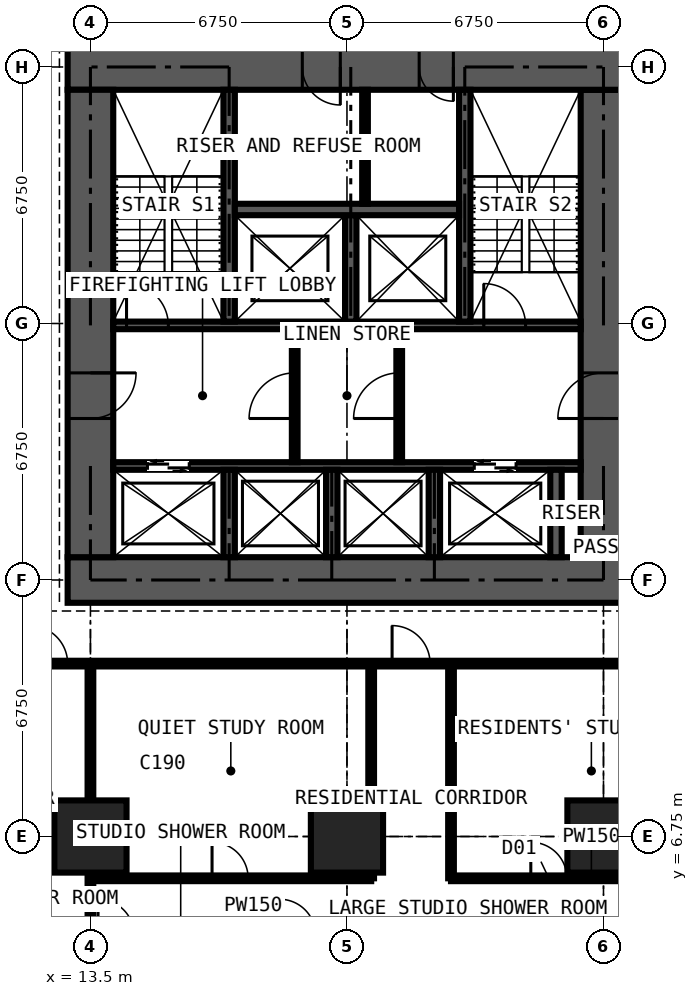
"""IFC4 building model, lengths in metres.
Left out: names, types, materials, properties, quantities, classifications, styles, units other than length and angle.
Written with IfcOpenShell. Run it as: python <this file> out.ifc"""

import sys

from ifc_helpers import new_model, si_unit, direction, frame, frame_2d, origin, origin_2d, place, context, subcontext, project, spatial, rectangle, extrude, element, fill, save


model = new_model("IFC4")
c1 = context("Model", 3, precision=1e-05, world=origin(), true_north=direction((0.0, 1.0)))
c2 = subcontext(c1, "Body", "Model", "MODEL_VIEW")
j1 = project(units=[si_unit("LENGTHUNIT", "METRE"), si_unit("PLANEANGLEUNIT", "RADIAN")], contexts=[c1])
p1 = place(None, origin())
s1 = spatial("IfcSite", under=j1, at=p1, CompositionType="ELEMENT")
p2 = place(p1, origin())
s2 = spatial("IfcBuilding", under=s1, at=p2, CompositionType="ELEMENT")
p3 = place(p2, frame((0.0, 0.0, 28.8)))
s3 = spatial("IfcBuildingStorey", under=s2, at=p3, CompositionType="ELEMENT", Elevation=28.8)
for number, where, z_axis, x_axis in (
    (1, (13.5, 6.75, 0.0), (0.0, 0.0, 1.0), (1.0, 0.0, 0.0)),
    (2, (20.25, 6.75, 0.0), (0.0, 0.0, 1.0), (1.0, 0.0, 0.0)),
    (3, (27.0, 6.75, 0.0), (0.0, 0.0, 1.0), (1.0, 0.0, 0.0)),
):
    element("IfcColumn", number, at=place(p3, frame(where, z_axis=z_axis, x_axis=x_axis)), inside=s3, PredefinedType="COLUMN", context=c2, shape_type="SweptSolid", body=[
        extrude(rectangle(XDim=1.9, YDim=1.9, at=origin_2d()), origin(), (0.0, 0.0, 1.0), 3.6),
    ])
p4 = place(p3, frame((12.9, 13.5, 0.0), z_axis=(0.0, 0.0, 1.0), x_axis=(1.0, 0.0, 0.0)))
e4 = element("IfcWall", 4, at=p4, inside=s3, PredefinedType="SHEAR", context=c2, shape_type="SweptSolid", body=[
    extrude(rectangle(XDim=14.7, YDim=1.2, at=frame_2d((7.35, 0.0))), origin(), (0.0, 0.0, 1.0), 3.6),
])
p5 = place(p3, frame((27.0, 14.1, 0.0), z_axis=(0.0, 0.0, 1.0), x_axis=(0.0, 1.0, 0.0)))
e5 = element("IfcWall", 5, at=p5, inside=s3, PredefinedType="SHEAR", context=c2, shape_type="SweptSolid", body=[
    extrude(rectangle(XDim=12.3, YDim=1.2, at=frame_2d((6.15, 0.0))), origin(), (0.0, 0.0, 1.0), 3.6),
])
p6 = place(p5, frame((3.65, 0.0, 0.0)))
e6 = element("IfcOpeningElement", 6, at=p6, cuts=e5, PredefinedType="OPENING", context=c2, shape_type="SweptSolid", body=[
    extrude(rectangle(XDim=1.2, YDim=2.2, at=frame_2d((0.6, 1.1))), frame((0.0, 0.61, 0.0), z_axis=(0.0, -1.0, 0.0), x_axis=(1.0, 0.0, 0.0)), (0.0, 0.0, 1.0), 1.22),
])
p7 = place(p3, frame((27.6, 27.0, 0.0), z_axis=(0.0, 0.0, 1.0), x_axis=(-1.0, 0.0, 0.0)))
e7 = element("IfcWall", 7, at=p7, inside=s3, PredefinedType="SHEAR", context=c2, shape_type="SweptSolid", body=[
    extrude(rectangle(XDim=14.7, YDim=1.2, at=frame_2d((7.35, 0.0))), origin(), (0.0, 0.0, 1.0), 3.6),
])
p8 = place(p7, frame((4.55, 0.0, 0.0)))
e8 = element("IfcOpeningElement", 8, at=p8, cuts=e7, PredefinedType="OPENING", context=c2, shape_type="SweptSolid", body=[
    extrude(rectangle(XDim=0.9, YDim=2.2, at=frame_2d((0.45, 1.1))), frame((0.0, 0.61, 0.0), z_axis=(0.0, -1.0, 0.0), x_axis=(1.0, 0.0, 0.0)), (0.0, 0.0, 1.0), 1.22),
])
p9 = place(p7, frame((7.525, 0.0, 0.0)))
e9 = element("IfcOpeningElement", 9, at=p9, cuts=e7, PredefinedType="OPENING", context=c2, shape_type="SweptSolid", body=[
    extrude(rectangle(XDim=1.0, YDim=2.2, at=frame_2d((0.5, 1.1))), frame((0.0, 0.61, 0.0), z_axis=(0.0, -1.0, 0.0), x_axis=(1.0, 0.0, 0.0)), (0.0, 0.0, 1.0), 1.22),
])
p10 = place(p3, frame((13.5, 26.4, 0.0), z_axis=(0.0, 0.0, 1.0), x_axis=(0.0, -1.0, 0.0)))
e10 = element("IfcWall", 10, at=p10, inside=s3, PredefinedType="SHEAR", context=c2, shape_type="SweptSolid", body=[
    extrude(rectangle(XDim=12.3, YDim=1.2, at=frame_2d((6.15, 0.0))), origin(), (0.0, 0.0, 1.0), 3.6),
])
p11 = place(p10, frame((7.45, 0.0, 0.0)))
e11 = element("IfcOpeningElement", 11, at=p11, cuts=e10, PredefinedType="OPENING", context=c2, shape_type="SweptSolid", body=[
    extrude(rectangle(XDim=1.2, YDim=2.2, at=frame_2d((0.6, 1.1))), frame((0.0, 0.61, 0.0), z_axis=(0.0, -1.0, 0.0), x_axis=(1.0, 0.0, 0.0)), (0.0, 0.0, 1.0), 1.22),
])
p12 = place(p3, frame((14.1, 16.5, 0.0), z_axis=(0.0, 0.0, 1.0), x_axis=(1.0, 0.0, 0.0)))
e12 = element("IfcWall", 12, at=p12, inside=s3, PredefinedType="SHEAR", context=c2, shape_type="SweptSolid", body=[
    extrude(rectangle(XDim=12.3, YDim=0.2, at=frame_2d((6.15, 0.0))), origin(), (0.0, 0.0, 1.0), 3.6),
])
p13 = place(p12, frame((0.9, 0.0, 0.0)))
e13 = element("IfcOpeningElement", 13, at=p13, cuts=e12, PredefinedType="OPENING", context=c2, shape_type="SweptSolid", body=[
    extrude(rectangle(XDim=1.1, YDim=2.2, at=frame_2d((0.55, 1.1))), frame((0.0, 0.11, 0.0), z_axis=(0.0, -1.0, 0.0), x_axis=(1.0, 0.0, 0.0)), (0.0, 0.0, 1.0), 0.22),
])
p14 = place(p12, frame((9.5, 0.0, 0.0)))
e14 = element("IfcOpeningElement", 14, at=p14, cuts=e12, PredefinedType="OPENING", context=c2, shape_type="SweptSolid", body=[
    extrude(rectangle(XDim=1.1, YDim=2.2, at=frame_2d((0.55, 1.1))), frame((0.0, 0.11, 0.0), z_axis=(0.0, -1.0, 0.0), x_axis=(1.0, 0.0, 0.0)), (0.0, 0.0, 1.0), 0.22),
])
p15 = place(p3, frame((14.1, 20.2, 0.0), z_axis=(0.0, 0.0, 1.0), x_axis=(1.0, 0.0, 0.0)))
e15 = element("IfcWall", 15, at=p15, inside=s3, PredefinedType="SHEAR", context=c2, shape_type="SweptSolid", body=[
    extrude(rectangle(XDim=12.3, YDim=0.2, at=frame_2d((6.15, 0.0))), origin(), (0.0, 0.0, 1.0), 3.6),
])
p16 = place(p15, frame((0.35, 0.0, 0.0)))
e16 = element("IfcOpeningElement", 16, at=p16, cuts=e15, PredefinedType="OPENING", context=c2, shape_type="SweptSolid", body=[
    extrude(rectangle(XDim=1.1, YDim=2.2, at=frame_2d((0.55, 1.1))), frame((0.0, 0.11, 0.0), z_axis=(0.0, -1.0, 0.0), x_axis=(1.0, 0.0, 0.0)), (0.0, 0.0, 1.0), 0.22),
])
p17 = place(p15, frame((9.75, 0.0, 0.0)))
e17 = element("IfcOpeningElement", 17, at=p17, cuts=e15, PredefinedType="OPENING", context=c2, shape_type="SweptSolid", body=[
    extrude(rectangle(XDim=1.1, YDim=2.2, at=frame_2d((0.55, 1.1))), frame((0.0, 0.11, 0.0), z_axis=(0.0, -1.0, 0.0), x_axis=(1.0, 0.0, 0.0)), (0.0, 0.0, 1.0), 0.22),
])
for number, where, z_axis, x_axis in (
    (18, (17.15, 20.3, 0.0), (0.0, 0.0, 1.0), (0.0, 1.0, 0.0)),
    (19, (23.35, 20.3, 0.0), (0.0, 0.0, 1.0), (0.0, 1.0, 0.0)),
):
    element("IfcWall", number, at=place(p3, frame(where, z_axis=z_axis, x_axis=x_axis)), inside=s3, PredefinedType="SHEAR", context=c2, shape_type="SweptSolid", body=[
        extrude(rectangle(XDim=6.1, YDim=0.3, at=frame_2d((3.05, 0.0))), origin(), (0.0, 0.0, 1.0), 3.6),
    ])
p18 = place(p3, frame((20.35, 20.3, 0.0), z_axis=(0.0, 0.0, 1.0), x_axis=(0.0, 1.0, 0.0)))
e20 = element("IfcWall", 20, at=p18, inside=s3, PredefinedType="SHEAR", context=c2, shape_type="SweptSolid", body=[
    extrude(rectangle(XDim=2.8, YDim=0.3, at=frame_2d((1.4, 0.0))), origin(), (0.0, 0.0, 1.0), 3.6),
])
p19 = place(p3, frame((17.3, 23.25, 0.0), z_axis=(0.0, 0.0, 1.0), x_axis=(1.0, 0.0, 0.0)))
e21 = element("IfcWall", 21, at=p19, inside=s3, PredefinedType="SHEAR", context=c2, shape_type="SweptSolid", body=[
    extrude(rectangle(XDim=5.9, YDim=0.3, at=frame_2d((2.95, 0.0))), origin(), (0.0, 0.0, 1.0), 3.6),
])
for number, where, z_axis, x_axis in (
    (22, (17.15, 14.1, 0.0), (0.0, 0.0, 1.0), (0.0, 1.0, 0.0)),
    (23, (19.85, 14.1, 0.0), (0.0, 0.0, 1.0), (0.0, 1.0, 0.0)),
    (24, (22.55, 14.1, 0.0), (0.0, 0.0, 1.0), (0.0, 1.0, 0.0)),
    (25, (25.75, 14.1, 0.0), (0.0, 0.0, 1.0), (0.0, 1.0, 0.0)),
):
    element("IfcWall", number, at=place(p3, frame(where, z_axis=z_axis, x_axis=x_axis)), inside=s3, PredefinedType="SHEAR", context=c2, shape_type="SweptSolid", body=[
        extrude(rectangle(XDim=2.3, YDim=0.3, at=frame_2d((1.15, 0.0))), origin(), (0.0, 0.0, 1.0), 3.6),
    ])
p20 = place(p3, frame((18.875, 16.6, 0.0), z_axis=(0.0, 0.0, 1.0), x_axis=(0.0, 1.0, 0.0)))
e26 = element("IfcWall", 26, at=p20, inside=s3, PredefinedType="PARTITIONING", context=c2, shape_type="SweptSolid", body=[
    extrude(rectangle(XDim=3.5, YDim=0.15, at=frame_2d((1.75, 0.0))), origin(), (0.0, 0.0, 1.0), 3.375),
])
p21 = place(p20, frame((1.15, 0.0, 0.0)))
e27 = element("IfcOpeningElement", 27, at=p21, cuts=e26, PredefinedType="OPENING", context=c2, shape_type="SweptSolid", body=[
    extrude(rectangle(XDim=1.2, YDim=2.2, at=frame_2d((0.6, 1.1))), frame((0.0, 0.085, 0.0), z_axis=(0.0, -1.0, 0.0), x_axis=(1.0, 0.0, 0.0)), (0.0, 0.0, 1.0), 0.17),
])
p22 = place(p3, frame((21.625, 16.6, 0.0), z_axis=(0.0, 0.0, 1.0), x_axis=(0.0, 1.0, 0.0)))
e28 = element("IfcWall", 28, at=p22, inside=s3, PredefinedType="PARTITIONING", context=c2, shape_type="SweptSolid", body=[
    extrude(rectangle(XDim=3.5, YDim=0.15, at=frame_2d((1.75, 0.0))), origin(), (0.0, 0.0, 1.0), 3.375),
])
p23 = place(p22, frame((1.15, 0.0, 0.0)))
e29 = element("IfcOpeningElement", 29, at=p23, cuts=e28, PredefinedType="OPENING", context=c2, shape_type="SweptSolid", body=[
    extrude(rectangle(XDim=1.2, YDim=2.2, at=frame_2d((0.6, 1.1))), frame((0.0, 0.085, 0.0), z_axis=(0.0, -1.0, 0.0), x_axis=(1.0, 0.0, 0.0)), (0.0, 0.0, 1.0), 0.17),
])
p24 = place(p3, frame((20.725, 23.4, 0.0), z_axis=(0.0, 0.0, 1.0), x_axis=(0.0, 1.0, 0.0)))
e30 = element("IfcWall", 30, at=p24, inside=s3, PredefinedType="PARTITIONING", context=c2, shape_type="SweptSolid", body=[
    extrude(rectangle(XDim=3.0, YDim=0.15, at=frame_2d((1.5, 0.0))), origin(), (0.0, 0.0, 1.0), 3.375),
])
p25 = place(p3, frame((10.125, 11.3, 0.0), z_axis=(0.0, 0.0, 1.0), x_axis=(1.0, 0.0, 0.0)))
e31 = element("IfcWall", 31, at=p25, inside=s3, PredefinedType="PARTITIONING", context=c2, shape_type="SweptSolid", body=[
    extrude(rectangle(XDim=20.675, YDim=0.15, at=frame_2d((10.337, 0.0))), origin(), (0.0, 0.0, 1.0), 3.375),
])
p26 = place(p25, frame((1.775, 0.0, 0.0)))
e32 = element("IfcOpeningElement", 32, at=p26, cuts=e31, PredefinedType="OPENING", context=c2, shape_type="SweptSolid", body=[
    extrude(rectangle(XDim=1.0, YDim=2.2, at=frame_2d((0.5, 1.1))), frame((0.0, 0.085, 0.0), z_axis=(0.0, -1.0, 0.0), x_axis=(1.0, 0.0, 0.0)), (0.0, 0.0, 1.0), 0.17),
])
p27 = place(p25, frame((11.312, 0.0, 0.0)))
e33 = element("IfcOpeningElement", 33, at=p27, cuts=e31, PredefinedType="OPENING", context=c2, shape_type="SweptSolid", body=[
    extrude(rectangle(XDim=1.0, YDim=2.2, at=frame_2d((0.5, 1.1))), frame((0.0, 0.085, 0.0), z_axis=(0.0, -1.0, 0.0), x_axis=(1.0, 0.0, 0.0)), (0.0, 0.0, 1.0), 0.17),
])
p28 = place(p3, frame((13.5, -0.734, 0.0), z_axis=(0.0, 0.0, 1.0), x_axis=(0.0, 1.0, 0.0)))
e34 = element("IfcWall", 34, at=p28, inside=s3, PredefinedType="PARTITIONING", context=c2, shape_type="SweptSolid", body=[
    extrude(rectangle(XDim=12.034, YDim=0.15, at=frame_2d((6.017, 0.0))), origin(), (0.0, 0.0, 1.0), 2.61),
])
p29 = place(p3, frame((13.5, 5.65, 0.0), z_axis=(0.0, 0.0, 1.0), x_axis=(1.0, 0.0, 0.0)))
e35 = element("IfcWall", 35, at=p29, inside=s3, PredefinedType="PARTITIONING", context=c2, shape_type="SweptSolid", body=[
    extrude(rectangle(XDim=7.387, YDim=0.15, at=frame_2d((3.694, 0.0))), origin(), (0.0, 0.0, 1.0), 3.375),
])
p30 = place(p29, frame((3.2, 0.0, 0.0)))
e36 = element("IfcOpeningElement", 36, at=p30, cuts=e35, PredefinedType="OPENING", context=c2, shape_type="SweptSolid", body=[
    extrude(rectangle(XDim=0.95, YDim=2.2, at=frame_2d((0.475, 1.1))), frame((0.0, 0.085, 0.0), z_axis=(0.0, -1.0, 0.0), x_axis=(1.0, 0.0, 0.0)), (0.0, 0.0, 1.0), 0.17),
])
p31 = place(p3, frame((20.887, 5.65, 0.0), z_axis=(0.0, 0.0, 1.0), x_axis=(0.0, 1.0, 0.0)))
e37 = element("IfcWall", 37, at=p31, inside=s3, PredefinedType="PARTITIONING", context=c2, shape_type="SweptSolid", body=[
    extrude(rectangle(XDim=5.65, YDim=0.15, at=frame_2d((2.825, 0.0))), origin(), (0.0, 0.0, 1.0), 3.375),
])
p32 = place(p3, frame((22.988, 5.65, 0.0), z_axis=(0.0, 0.0, 1.0), x_axis=(1.0, 0.0, 0.0)))
e38 = element("IfcWall", 38, at=p32, inside=s3, PredefinedType="PARTITIONING", context=c2, shape_type="SweptSolid", body=[
    extrude(rectangle(XDim=7.387, YDim=0.15, at=frame_2d((3.694, 0.0))), origin(), (0.0, 0.0, 1.0), 3.375),
])
p33 = place(p32, frame((2.1, 0.0, 0.0)))
e39 = element("IfcOpeningElement", 39, at=p33, cuts=e38, PredefinedType="OPENING", context=c2, shape_type="SweptSolid", body=[
    extrude(rectangle(XDim=0.95, YDim=2.2, at=frame_2d((0.475, 1.1))), frame((0.0, 0.085, 0.0), z_axis=(0.0, -1.0, 0.0), x_axis=(1.0, 0.0, 0.0)), (0.0, 0.0, 1.0), 0.17),
])
p34 = place(p3, frame((22.988, 5.65, 0.0), z_axis=(0.0, 0.0, 1.0), x_axis=(0.0, 1.0, 0.0)))
e40 = element("IfcWall", 40, at=p34, inside=s3, PredefinedType="PARTITIONING", context=c2, shape_type="SweptSolid", body=[
    extrude(rectangle(XDim=5.65, YDim=0.15, at=frame_2d((2.825, 0.0))), origin(), (0.0, 0.0, 1.0), 3.375),
])
p35 = place(p13, origin())
e41 = element("IfcDoor", 41, at=p35, inside=s3, OperationType="DOUBLE_DOOR_SLIDING", PredefinedType="DOOR", context=c2, shape_type="SweptSolid", body=[
    extrude(rectangle(XDim=1.1, YDim=2.2, at=frame_2d((0.55, 1.1))), frame((0.0, 0.025, 0.0), z_axis=(0.0, -1.0, 0.0), x_axis=(1.0, 0.0, 0.0)), (0.0, 0.0, 1.0), 0.05),
])
fill(e13, e41)
p36 = place(p14, origin())
e42 = element("IfcDoor", 42, at=p36, inside=s3, OperationType="DOUBLE_DOOR_SLIDING", PredefinedType="DOOR", context=c2, shape_type="SweptSolid", body=[
    extrude(rectangle(XDim=1.1, YDim=2.2, at=frame_2d((0.55, 1.1))), frame((0.0, 0.025, 0.0), z_axis=(0.0, -1.0, 0.0), x_axis=(1.0, 0.0, 0.0)), (0.0, 0.0, 1.0), 0.05),
])
fill(e14, e42)
p37 = place(p11, origin())
e43 = element("IfcDoor", 43, at=p37, inside=s3, OperationType="DOUBLE_DOOR_SINGLE_SWING", PredefinedType="DOOR", context=c2, shape_type="SweptSolid", body=[
    extrude(rectangle(XDim=1.2, YDim=2.2, at=frame_2d((0.6, 1.1))), frame((0.0, 0.025, 0.0), z_axis=(0.0, -1.0, 0.0), x_axis=(1.0, 0.0, 0.0)), (0.0, 0.0, 1.0), 0.05),
])
fill(e11, e43)
p38 = place(p6, origin())
e44 = element("IfcDoor", 44, at=p38, inside=s3, OperationType="DOUBLE_DOOR_SINGLE_SWING", PredefinedType="DOOR", context=c2, shape_type="SweptSolid", body=[
    extrude(rectangle(XDim=1.2, YDim=2.2, at=frame_2d((0.6, 1.1))), frame((0.0, 0.025, 0.0), z_axis=(0.0, -1.0, 0.0), x_axis=(1.0, 0.0, 0.0)), (0.0, 0.0, 1.0), 0.05),
])
fill(e6, e44)
p39 = place(p21, origin())
e45 = element("IfcDoor", 45, at=p39, inside=s3, OperationType="DOUBLE_DOOR_SINGLE_SWING", PredefinedType="DOOR", context=c2, shape_type="SweptSolid", body=[
    extrude(rectangle(XDim=1.2, YDim=2.2, at=frame_2d((0.6, 1.1))), frame((0.0, 0.025, 0.0), z_axis=(0.0, -1.0, 0.0), x_axis=(1.0, 0.0, 0.0)), (0.0, 0.0, 1.0), 0.05),
])
fill(e27, e45)
p40 = place(p23, origin())
e46 = element("IfcDoor", 46, at=p40, inside=s3, OperationType="DOUBLE_DOOR_SINGLE_SWING", PredefinedType="DOOR", context=c2, shape_type="SweptSolid", body=[
    extrude(rectangle(XDim=1.2, YDim=2.2, at=frame_2d((0.6, 1.1))), frame((0.0, 0.025, 0.0), z_axis=(0.0, -1.0, 0.0), x_axis=(1.0, 0.0, 0.0)), (0.0, 0.0, 1.0), 0.05),
])
fill(e29, e46)
p41 = place(p8, origin())
e47 = element("IfcDoor", 47, at=p41, inside=s3, OperationType="SINGLE_SWING_LEFT", PredefinedType="DOOR", context=c2, shape_type="SweptSolid", body=[
    extrude(rectangle(XDim=0.9, YDim=2.2, at=frame_2d((0.45, 1.1))), frame((0.0, 0.4, 0.0), z_axis=(0.0, -1.0, 0.0), x_axis=(1.0, 0.0, 0.0)), (0.0, 0.0, 1.0), 0.8),
])
fill(e8, e47)
p42 = place(p9, origin())
e48 = element("IfcDoor", 48, at=p42, inside=s3, OperationType="SINGLE_SWING_LEFT", PredefinedType="DOOR", context=c2, shape_type="SweptSolid", body=[
    extrude(rectangle(XDim=1.0, YDim=2.2, at=frame_2d((0.5, 1.1))), frame((0.0, 0.025, 0.0), z_axis=(0.0, -1.0, 0.0), x_axis=(1.0, 0.0, 0.0)), (0.0, 0.0, 1.0), 0.05),
])
fill(e9, e48)
p43 = place(p16, origin())
e49 = element("IfcDoor", 49, at=p43, inside=s3, OperationType="SINGLE_SWING_LEFT", PredefinedType="DOOR", context=c2, shape_type="SweptSolid", body=[
    extrude(rectangle(XDim=1.1, YDim=2.2, at=frame_2d((0.55, 1.1))), frame((0.0, 0.025, 0.0), z_axis=(0.0, -1.0, 0.0), x_axis=(1.0, 0.0, 0.0)), (0.0, 0.0, 1.0), 0.05),
])
fill(e16, e49)
p44 = place(p17, origin())
e50 = element("IfcDoor", 50, at=p44, inside=s3, OperationType="SINGLE_SWING_LEFT", PredefinedType="DOOR", context=c2, shape_type="SweptSolid", body=[
    extrude(rectangle(XDim=1.1, YDim=2.2, at=frame_2d((0.55, 1.1))), frame((0.0, 0.025, 0.0), z_axis=(0.0, -1.0, 0.0), x_axis=(1.0, 0.0, 0.0)), (0.0, 0.0, 1.0), 0.05),
])
fill(e17, e50)
p45 = place(p26, origin())
e51 = element("IfcDoor", 51, at=p45, inside=s3, OperationType="SINGLE_SWING_LEFT", PredefinedType="DOOR", context=c2, shape_type="SweptSolid", body=[
    extrude(rectangle(XDim=1.0, YDim=2.2, at=frame_2d((0.5, 1.1))), frame((0.0, 0.025, 0.0), z_axis=(0.0, -1.0, 0.0), x_axis=(1.0, 0.0, 0.0)), (0.0, 0.0, 1.0), 0.05),
])
fill(e32, e51)
p46 = place(p27, origin())
e52 = element("IfcDoor", 52, at=p46, inside=s3, OperationType="SINGLE_SWING_LEFT", PredefinedType="DOOR", context=c2, shape_type="SweptSolid", body=[
    extrude(rectangle(XDim=1.0, YDim=2.2, at=frame_2d((0.5, 1.1))), frame((0.0, 0.025, 0.0), z_axis=(0.0, -1.0, 0.0), x_axis=(1.0, 0.0, 0.0)), (0.0, 0.0, 1.0), 0.05),
])
fill(e33, e52)
p47 = place(p33, origin())
e53 = element("IfcDoor", 53, at=p47, inside=s3, OperationType="SINGLE_SWING_LEFT", PredefinedType="DOOR", context=c2, shape_type="SweptSolid", body=[
    extrude(rectangle(XDim=0.95, YDim=2.2, at=frame_2d((0.475, 1.1))), frame((0.0, 0.025, 0.0), z_axis=(0.0, -1.0, 0.0), x_axis=(1.0, 0.0, 0.0)), (0.0, 0.0, 1.0), 0.05),
])
fill(e39, e53)
p48 = place(p30, origin())
e54 = element("IfcDoor", 54, at=p48, inside=s3, OperationType="SINGLE_SWING_LEFT", PredefinedType="DOOR", context=c2, shape_type="SweptSolid", body=[
    extrude(rectangle(XDim=0.95, YDim=2.2, at=frame_2d((0.475, 1.1))), frame((0.0, 0.025, 0.0), z_axis=(0.0, -1.0, 0.0), x_axis=(1.0, 0.0, 0.0)), (0.0, 0.0, 1.0), 0.05),
])
fill(e36, e54)
save(model, sys.argv[1])
